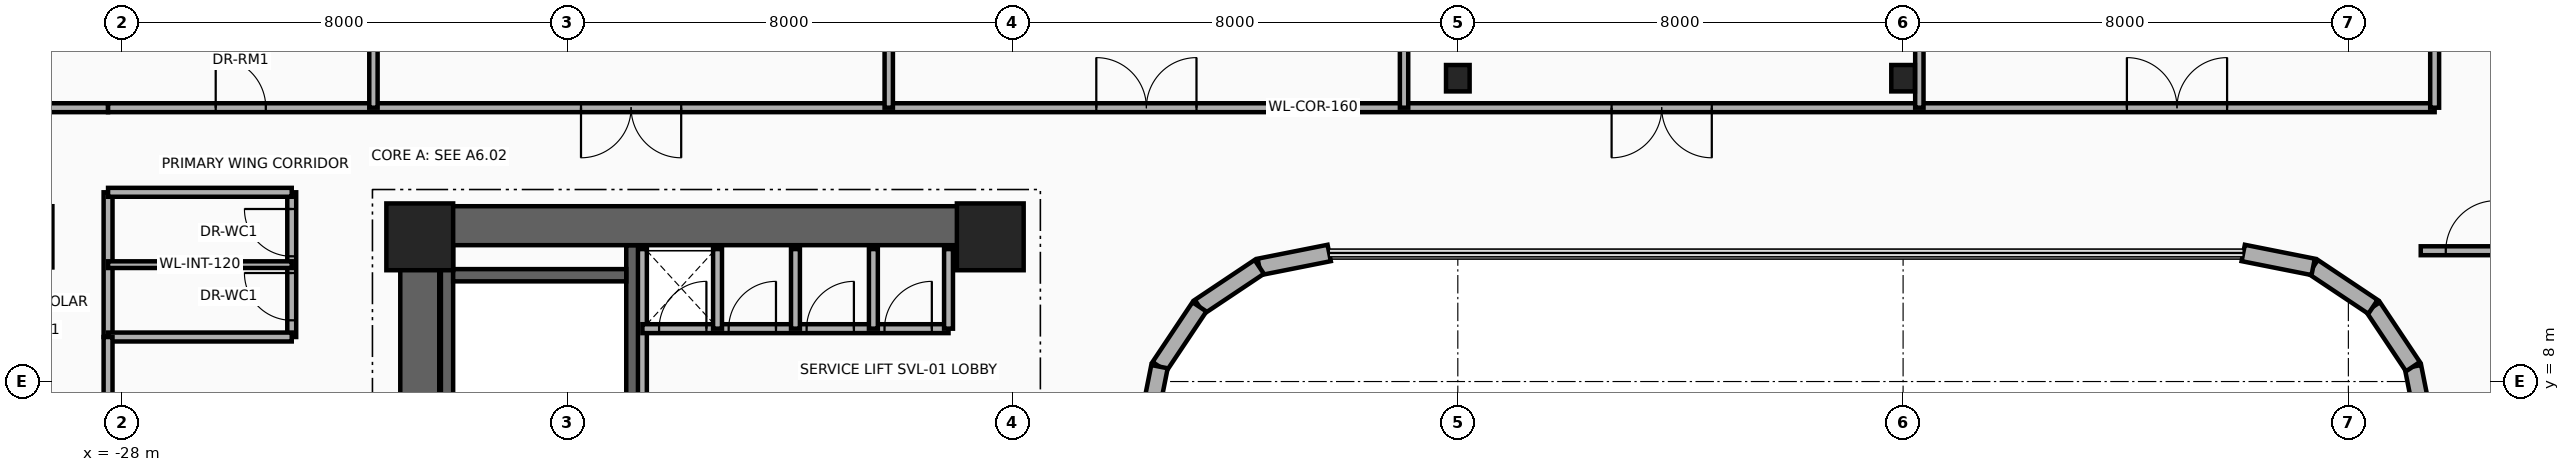
"""IFC4 building model, lengths in metres.
Left out: names, types, materials, properties, quantities, classifications, styles, units other than length and angle.
Written with IfcOpenShell. Run it as: python <this file> out.ifc"""

import sys

from ifc_helpers import new_model, si_unit, direction, frame, frame_2d, origin, origin_2d, place, context, subcontext, project, spatial, rectangle, i_section, extrude, source, transform, mapped, element, fill, save


model = new_model("IFC4")
c1 = context("Model", 3, precision=1e-05, world=origin(), true_north=direction((0.0, 1.0)))
c2 = subcontext(c1, "Body", "Model", "MODEL_VIEW")
j1 = project(units=[si_unit("LENGTHUNIT", "METRE"), si_unit("PLANEANGLEUNIT", "RADIAN")], contexts=[c1])
p1 = place(None, origin())
s1 = spatial("IfcSite", under=j1, at=p1, CompositionType="ELEMENT")
p2 = place(p1, origin())
s2 = spatial("IfcBuilding", under=s1, at=p2, CompositionType="ELEMENT")
p3 = place(p2, frame((0.0, 0.0, 139.0)))
s3 = spatial("IfcBuildingStorey", under=s2, at=p3, CompositionType="ELEMENT", Elevation=139.0)
for number, where, z_axis, x_axis in (
    (1, (-22.16, 1.78, 0.0), (0.0, 0.0, 1.0), (0.0, 1.0, 0.0)),
    (2, (-18.83, 1.78, 0.0), (0.0, 0.0, 1.0), (0.0, 1.0, 0.0)),
):
    element("IfcWall", number, at=place(p3, frame(where, z_axis=z_axis, x_axis=x_axis)), inside=s3, PredefinedType="SHEAR", context=c2, shape_type="SweptSolid", body=[
        extrude(rectangle(XDim=8.67, YDim=0.22, at=frame_2d((4.335, 0.0))), origin(), (0.0, 0.0, 1.0), 3.46),
    ])
p4 = place(p3, frame((-22.05, 9.91, 0.0), z_axis=(0.0, 0.0, 1.0), x_axis=(1.0, 0.0, 0.0)))
e3 = element("IfcWall", 3, at=p4, inside=s3, PredefinedType="SHEAR", context=c2, shape_type="SweptSolid", body=[
    extrude(rectangle(XDim=3.11, YDim=0.22, at=frame_2d((1.555, 0.0))), origin(), (0.0, 0.0, 1.0), 3.46),
])
p5 = place(p3, frame((-22.65, -11.15, 0.0), z_axis=(0.0, 0.0, 1.0), x_axis=(0.0, 1.0, 0.0)))
e4 = element("IfcWall", 4, at=p5, inside=s3, PredefinedType="SHEAR", context=c2, shape_type="SweptSolid", body=[
    extrude(rectangle(XDim=22.3, YDim=0.7, at=frame_2d((11.15, 0.0))), origin(), (0.0, 0.0, 1.0), 3.46),
])
p6 = place(p3, frame((-22.65, 10.8, 0.0), z_axis=(0.0, 0.0, 1.0), x_axis=(1.0, 0.0, 0.0)))
e5 = element("IfcWall", 5, at=p6, inside=s3, PredefinedType="SHEAR", context=c2, shape_type="SweptSolid", body=[
    extrude(rectangle(XDim=10.25, YDim=0.7, at=frame_2d((5.125, 0.0))), origin(), (0.0, 0.0, 1.0), 3.46),
])
m1 = source(origin(), c2, "Body", "SweptSolid", [
    extrude(rectangle(XDim=1.2, YDim=1.2, at=origin_2d()), origin(), (0.0, 0.0, 1.0), 3.7),
])
for number, where, z_axis, x_axis in (
    (6, (-22.65, 10.6, 0.0), (0.0, 0.0, 1.0), (1.0, 0.0, 0.0)),
    (7, (-12.4, 10.6, 0.0), (0.0, 0.0, 1.0), (1.0, 0.0, 0.0)),
):
    element("IfcColumn", number, at=place(p3, frame(where, z_axis=z_axis, x_axis=x_axis)), inside=s3, PredefinedType="COLUMN", context=c2, shape_type="MappedRepresentation", body=[
        mapped(m1, transform((0.0, 0.0, 0.0), x_axis=(1.0, 0.0, 0.0), y_axis=(0.0, 1.0, 0.0), z_axis=(0.0, 0.0, 1.0), scale=1.0)),
    ])
m2 = source(origin(), c2, "Body", "SweptSolid", [
    extrude(i_section(OverallWidth=0.424, OverallDepth=0.474, WebThickness=0.048, FlangeThickness=0.077, at=origin_2d()), origin(), (0.0, 0.0, 1.0), 3.7),
])
for number, where, z_axis, x_axis in (
    (8, (-4.0, 13.45, 0.0), (0.0, 0.0, 1.0), (1.0, 0.0, 0.0)),
    (9, (4.0, 13.45, 0.0), (0.0, 0.0, 1.0), (1.0, 0.0, 0.0)),
):
    element("IfcColumn", number, at=place(p3, frame(where, z_axis=z_axis, x_axis=x_axis)), inside=s3, PredefinedType="COLUMN", context=c2, shape_type="MappedRepresentation", body=[
        mapped(m2, transform((0.0, 0.0, 0.0), x_axis=(1.0, 0.0, 0.0), y_axis=(0.0, 1.0, 0.0), z_axis=(0.0, 0.0, 1.0), scale=1.0)),
    ])
p7 = place(p3, frame((13.41, 7.011, 0.0), z_axis=(0.0, 0.0, 1.0), x_axis=(-0.195090163074, 0.980785312019, 0.0)))
e10 = element("IfcWall", 10, at=p7, inside=s3, PredefinedType="SOLIDWALL", context=c2, shape_type="SweptSolid", body=[
    extrude(rectangle(XDim=1.281, YDim=0.3, at=frame_2d((0.641, 0.0))), origin(), (0.0, 0.0, 1.0), 3.46),
])
for number, where, z_axis, x_axis in (
    (11, (13.16, 8.268, 0.0), (0.0, 0.0, 1.0), (-0.556, 0.831, 0.0)),
    (12, (12.442, 9.342, 0.0), (0.0, 0.0, 1.0), (-0.831, 0.556, 0.0)),
):
    element("IfcWall", number, at=place(p3, frame(where, z_axis=z_axis, x_axis=x_axis)), inside=s3, PredefinedType="SOLIDWALL", context=c2, shape_type="SweptSolid", body=[
        extrude(rectangle(XDim=1.292, YDim=0.3, at=frame_2d((0.646, 0.0))), origin(), (0.0, 0.0, 1.0), 3.46),
    ])
for number, where, z_axis, x_axis in (
    (13, (11.367, 10.06, 0.0), (0.0, 0.0, 1.0), (-0.981, 0.195, 0.0)),
    (14, (-6.311, 10.31, 0.0), (0.0, 0.0, 1.0), (-0.981, -0.195, 0.0)),
):
    element("IfcWall", number, at=place(p3, frame(where, z_axis=z_axis, x_axis=x_axis)), inside=s3, PredefinedType="SOLIDWALL", context=c2, shape_type="SweptSolid", body=[
        extrude(rectangle(XDim=1.281, YDim=0.3, at=frame_2d((0.641, 0.0))), origin(), (0.0, 0.0, 1.0), 3.46),
    ])
p8 = place(p3, frame((-7.567, 10.06, 0.0), z_axis=(0.0, 0.0, 1.0), x_axis=(-0.831497739511, -0.555528135371, 0.0)))
e15 = element("IfcWall", 15, at=p8, inside=s3, PredefinedType="SOLIDWALL", context=c2, shape_type="SweptSolid", body=[
    extrude(rectangle(XDim=1.292, YDim=0.3, at=frame_2d((0.646, 0.0))), origin(), (0.0, 0.0, 1.0), 3.46),
])
p9 = place(p3, frame((-8.642, 9.342, 0.0), z_axis=(0.0, 0.0, 1.0), x_axis=(-0.555615398575, -0.831439431869, 0.0)))
e16 = element("IfcWall", 16, at=p9, inside=s3, PredefinedType="SOLIDWALL", context=c2, shape_type="SweptSolid", body=[
    extrude(rectangle(XDim=1.292, YDim=0.3, at=frame_2d((0.646, 0.0))), origin(), (0.0, 0.0, 1.0), 3.46),
])
p10 = place(p3, frame((-9.36, 8.268, 0.0), z_axis=(0.0, 0.0, 1.0), x_axis=(-0.195090163074, -0.980785312019, 0.0)))
e17 = element("IfcWall", 17, at=p10, inside=s3, PredefinedType="SOLIDWALL", context=c2, shape_type="SweptSolid", body=[
    extrude(rectangle(XDim=1.281, YDim=0.3, at=frame_2d((0.641, 0.0))), origin(), (0.0, 0.0, 1.0), 3.46),
])
p11 = place(p3, frame((-18.65, 7.45, 0.0), z_axis=(0.0, 0.0, 1.0), x_axis=(0.0, 1.0, 0.0)))
e18 = element("IfcWall", 18, at=p11, inside=s3, PredefinedType="PARTITIONING", context=c2, shape_type="SweptSolid", body=[
    extrude(rectangle(XDim=2.93, YDim=0.16, at=frame_2d((1.465, 0.0))), origin(), (0.0, 0.0, 1.0), 3.46),
])
p12 = place(p3, frame((-18.65, 8.95, 0.0), z_axis=(0.0, 0.0, 1.0), x_axis=(1.0, 0.0, 0.0)))
e19 = element("IfcWall", 19, at=p12, inside=s3, PredefinedType="PARTITIONING", context=c2, shape_type="SweptSolid", body=[
    extrude(rectangle(XDim=5.5, YDim=0.16, at=frame_2d((2.75, 0.0))), origin(), (0.0, 0.0, 1.0), 3.46),
])
p13 = place(p12, frame((0.3, 0.0, 0.0)))
e20 = element("IfcOpeningElement", 20, at=p13, cuts=e19, PredefinedType="OPENING", context=c2, shape_type="SweptSolid", body=[
    extrude(rectangle(XDim=0.85, YDim=2.05, at=frame_2d((0.425, 1.025))), frame((0.0, 0.095, 0.0), z_axis=(0.0, -1.0, 0.0), x_axis=(1.0, 0.0, 0.0)), (0.0, 0.0, 1.0), 0.19),
])
p14 = place(p12, frame((1.55, 0.0, 0.0)))
e21 = element("IfcOpeningElement", 21, at=p14, cuts=e19, PredefinedType="OPENING", context=c2, shape_type="SweptSolid", body=[
    extrude(rectangle(XDim=0.85, YDim=2.05, at=frame_2d((0.425, 1.025))), frame((0.0, 0.095, 0.0), z_axis=(0.0, -1.0, 0.0), x_axis=(1.0, 0.0, 0.0)), (0.0, 0.0, 1.0), 0.19),
])
p15 = place(p12, frame((2.95, 0.0, 0.0)))
e22 = element("IfcOpeningElement", 22, at=p15, cuts=e19, PredefinedType="OPENING", context=c2, shape_type="SweptSolid", body=[
    extrude(rectangle(XDim=0.85, YDim=2.05, at=frame_2d((0.425, 1.025))), frame((0.0, 0.095, 0.0), z_axis=(0.0, -1.0, 0.0), x_axis=(1.0, 0.0, 0.0)), (0.0, 0.0, 1.0), 0.19),
])
p16 = place(p12, frame((4.35, 0.0, 0.0)))
e23 = element("IfcOpeningElement", 23, at=p16, cuts=e19, PredefinedType="OPENING", context=c2, shape_type="SweptSolid", body=[
    extrude(rectangle(XDim=0.85, YDim=2.05, at=frame_2d((0.425, 1.025))), frame((0.0, 0.095, 0.0), z_axis=(0.0, -1.0, 0.0), x_axis=(1.0, 0.0, 0.0)), (0.0, 0.0, 1.0), 0.19),
])
for number, where, z_axis, x_axis in (
    (24, (-13.15, 8.95, 0.0), (0.0, 0.0, 1.0), (0.0, 1.0, 0.0)),
    (25, (-17.3, 8.95, 0.0), (0.0, 0.0, 1.0), (0.0, 1.0, 0.0)),
    (26, (-15.9, 8.95, 0.0), (0.0, 0.0, 1.0), (0.0, 1.0, 0.0)),
    (27, (-14.5, 8.95, 0.0), (0.0, 0.0, 1.0), (0.0, 1.0, 0.0)),
):
    element("IfcWall", number, at=place(p3, frame(where, z_axis=z_axis, x_axis=x_axis)), inside=s3, PredefinedType="PARTITIONING", context=c2, shape_type="SweptSolid", body=[
        extrude(rectangle(XDim=1.43, YDim=0.16, at=frame_2d((0.715, 0.0))), origin(), (0.0, 0.0, 1.0), 3.46),
    ])
p17 = place(p3, frame((-28.25, 8.8, 0.0), z_axis=(0.0, 0.0, 1.0), x_axis=(0.0, 1.0, 0.0)))
e28 = element("IfcWall", 28, at=p17, inside=s3, PredefinedType="PARTITIONING", context=c2, shape_type="SweptSolid", body=[
    extrude(rectangle(XDim=2.6, YDim=0.16, at=frame_2d((1.3, 0.0))), origin(), (0.0, 0.0, 1.0), 2.666),
])
p18 = place(p3, frame((-24.95, 8.8, 0.0), z_axis=(0.0, 0.0, 1.0), x_axis=(0.0, 1.0, 0.0)))
e29 = element("IfcWall", 29, at=p18, inside=s3, PredefinedType="PARTITIONING", context=c2, shape_type="SweptSolid", body=[
    extrude(rectangle(XDim=2.6, YDim=0.16, at=frame_2d((1.3, 0.0))), origin(), (0.0, 0.0, 1.0), 2.666),
])
p19 = place(p18, frame((0.3, 0.0, 0.0)))
e30 = element("IfcOpeningElement", 30, at=p19, cuts=e29, PredefinedType="OPENING", context=c2, shape_type="SweptSolid", body=[
    extrude(rectangle(XDim=0.85, YDim=2.1, at=frame_2d((0.425, 1.05))), frame((0.0, 0.095, 0.0), z_axis=(0.0, -1.0, 0.0), x_axis=(1.0, 0.0, 0.0)), (0.0, 0.0, 1.0), 0.19),
])
p20 = place(p18, frame((1.45, 0.0, 0.0)))
e31 = element("IfcOpeningElement", 31, at=p20, cuts=e29, PredefinedType="OPENING", context=c2, shape_type="SweptSolid", body=[
    extrude(rectangle(XDim=0.85, YDim=2.1, at=frame_2d((0.425, 1.05))), frame((0.0, 0.095, 0.0), z_axis=(0.0, -1.0, 0.0), x_axis=(1.0, 0.0, 0.0)), (0.0, 0.0, 1.0), 0.19),
])
for number, where, z_axis, x_axis in (
    (32, (-28.25, 8.8, 0.0), (0.0, 0.0, 1.0), (1.0, 0.0, 0.0)),
    (33, (-28.25, 11.4, 0.0), (0.0, 0.0, 1.0), (1.0, 0.0, 0.0)),
):
    element("IfcWall", number, at=place(p3, frame(where, z_axis=z_axis, x_axis=x_axis)), inside=s3, PredefinedType="PARTITIONING", context=c2, shape_type="SweptSolid", body=[
        extrude(rectangle(XDim=3.3, YDim=0.16, at=frame_2d((1.65, 0.0))), origin(), (0.0, 0.0, 1.0), 3.46),
    ])
p21 = place(p3, frame((-28.25, 10.1, 0.0), z_axis=(0.0, 0.0, 1.0), x_axis=(1.0, 0.0, 0.0)))
e34 = element("IfcWall", 34, at=p21, inside=s3, PredefinedType="PARTITIONING", context=c2, shape_type="SweptSolid", body=[
    extrude(rectangle(XDim=3.3, YDim=0.12, at=frame_2d((1.65, 0.0))), origin(), (0.0, 0.0, 1.0), 3.46),
])
p22 = place(p3, frame((-28.25, 7.6, 0.0), z_axis=(0.0, 0.0, 1.0), x_axis=(0.0, 1.0, 0.0)))
e35 = element("IfcWall", 35, at=p22, inside=s3, PredefinedType="PARTITIONING", context=c2, shape_type="SweptSolid", body=[
    extrude(rectangle(XDim=1.2, YDim=0.16, at=frame_2d((0.6, 0.0))), origin(), (0.0, 0.0, 1.0), 2.988),
])
p23 = place(p3, frame((-30.89, 12.92, 0.0), z_axis=(0.0, 0.0, 1.0), x_axis=(1.0, 0.0, 0.0)))
e36 = element("IfcWall", 36, at=p23, inside=s3, PredefinedType="PARTITIONING", context=c2, shape_type="SweptSolid", body=[
    extrude(rectangle(XDim=2.64, YDim=0.16, at=frame_2d((1.32, 0.0))), origin(), (0.0, 0.0, 1.0), 2.896),
])
p24 = place(p3, frame((-28.25, 12.92, 0.0), z_axis=(0.0, 0.0, 1.0), x_axis=(1.0, 0.0, 0.0)))
e37 = element("IfcWall", 37, at=p24, inside=s3, PredefinedType="PARTITIONING", context=c2, shape_type="SweptSolid", body=[
    extrude(rectangle(XDim=41.8, YDim=0.16, at=frame_2d((20.9, 0.0))), origin(), (0.0, 0.0, 1.0), 2.666),
])
p25 = place(p24, frame((1.934, 0.0, 0.0)))
e38 = element("IfcOpeningElement", 38, at=p25, cuts=e37, PredefinedType="OPENING", context=c2, shape_type="SweptSolid", body=[
    extrude(rectangle(XDim=0.9, YDim=2.1, at=frame_2d((0.45, 1.05))), frame((0.0, 0.095, 0.0), z_axis=(0.0, -1.0, 0.0), x_axis=(1.0, 0.0, 0.0)), (0.0, 0.0, 1.0), 0.19),
])
p26 = place(p24, frame((8.497, 0.0, 0.0)))
e39 = element("IfcOpeningElement", 39, at=p26, cuts=e37, PredefinedType="OPENING", context=c2, shape_type="SweptSolid", body=[
    extrude(rectangle(XDim=1.8, YDim=2.15, at=frame_2d((0.9, 1.075))), frame((0.0, 0.095, 0.0), z_axis=(0.0, -1.0, 0.0), x_axis=(1.0, 0.0, 0.0)), (0.0, 0.0, 1.0), 0.19),
])
p27 = place(p24, frame((17.755, 0.0, 0.0)))
e40 = element("IfcOpeningElement", 40, at=p27, cuts=e37, PredefinedType="OPENING", context=c2, shape_type="SweptSolid", body=[
    extrude(rectangle(XDim=1.8, YDim=2.15, at=frame_2d((0.9, 1.075))), frame((0.0, 0.095, 0.0), z_axis=(0.0, -1.0, 0.0), x_axis=(1.0, 0.0, 0.0)), (0.0, 0.0, 1.0), 0.19),
])
p28 = place(p24, frame((27.013, 0.0, 0.0)))
e41 = element("IfcOpeningElement", 41, at=p28, cuts=e37, PredefinedType="OPENING", context=c2, shape_type="SweptSolid", body=[
    extrude(rectangle(XDim=1.8, YDim=2.15, at=frame_2d((0.9, 1.075))), frame((0.0, 0.095, 0.0), z_axis=(0.0, -1.0, 0.0), x_axis=(1.0, 0.0, 0.0)), (0.0, 0.0, 1.0), 0.19),
])
p29 = place(p24, frame((36.271, 0.0, 0.0)))
e42 = element("IfcOpeningElement", 42, at=p29, cuts=e37, PredefinedType="OPENING", context=c2, shape_type="SweptSolid", body=[
    extrude(rectangle(XDim=1.8, YDim=2.15, at=frame_2d((0.9, 1.075))), frame((0.0, 0.095, 0.0), z_axis=(0.0, -1.0, 0.0), x_axis=(1.0, 0.0, 0.0)), (0.0, 0.0, 1.0), 0.19),
])
p30 = place(p3, frame((13.55, 12.92, 0.0), z_axis=(0.0, 0.0, 1.0), x_axis=(0.0, 1.0, 0.0)))
e43 = element("IfcWall", 43, at=p30, inside=s3, PredefinedType="PARTITIONING", context=c2, shape_type="SweptSolid", body=[
    extrude(rectangle(XDim=5.857, YDim=0.16, at=frame_2d((2.928, 0.0))), origin(), (0.0, 0.0, 1.0), 2.666),
])
p31 = place(p3, frame((-23.482, 12.92, 0.0), z_axis=(0.0, 0.0, 1.0), x_axis=(0.0, 1.0, 0.0)))
e44 = element("IfcWall", 44, at=p31, inside=s3, PredefinedType="PARTITIONING", context=c2, shape_type="SweptSolid", body=[
    extrude(rectangle(XDim=6.409, YDim=0.15, at=frame_2d((3.204, 0.0))), origin(), (0.0, 0.0, 1.0), 2.666),
])
for number, where, z_axis, x_axis in (
    (45, (-14.224, 12.92, 0.0), (0.0, 0.0, 1.0), (0.0, 1.0, 0.0)),
    (46, (-4.966, 12.92, 0.0), (0.0, 0.0, 1.0), (0.0, 1.0, 0.0)),
):
    element("IfcWall", number, at=place(p3, frame(where, z_axis=z_axis, x_axis=x_axis)), inside=s3, PredefinedType="PARTITIONING", context=c2, shape_type="SweptSolid", body=[
        extrude(rectangle(XDim=7.196, YDim=0.15, at=frame_2d((3.598, 0.0))), origin(), (0.0, 0.0, 1.0), 2.666),
    ])
p32 = place(p3, frame((4.292, 12.92, 0.0), z_axis=(0.0, 0.0, 1.0), x_axis=(0.0, 1.0, 0.0)))
e47 = element("IfcWall", 47, at=p32, inside=s3, PredefinedType="PARTITIONING", context=c2, shape_type="SweptSolid", body=[
    extrude(rectangle(XDim=6.775, YDim=0.15, at=frame_2d((3.387, 0.0))), origin(), (0.0, 0.0, 1.0), 2.666),
])
p33 = place(p3, frame((13.3, 10.35, 0.0), z_axis=(0.0, 0.0, 1.0), x_axis=(1.0, 0.0, 0.0)))
e48 = element("IfcWall", 48, at=p33, inside=s3, PredefinedType="PARTITIONING", context=c2, shape_type="SweptSolid", body=[
    extrude(rectangle(XDim=2.1, YDim=0.16, at=frame_2d((1.05, 0.0))), origin(), (0.0, 0.0, 1.0), 2.666),
])
p34 = place(p33, frame((0.45, 0.0, 0.0)))
e49 = element("IfcOpeningElement", 49, at=p34, cuts=e48, PredefinedType="OPENING", context=c2, shape_type="SweptSolid", body=[
    extrude(rectangle(XDim=0.9, YDim=2.1, at=frame_2d((0.45, 1.05))), frame((0.0, 0.095, 0.0), z_axis=(0.0, -1.0, 0.0), x_axis=(1.0, 0.0, 0.0)), (0.0, 0.0, 1.0), 0.19),
])
p35 = place(p13, origin())
e50 = element("IfcDoor", 50, at=p35, inside=s3, OperationType="SINGLE_SWING_LEFT", PredefinedType="DOOR", context=c2, shape_type="SweptSolid", body=[
    extrude(rectangle(XDim=0.85, YDim=2.05, at=frame_2d((0.425, 1.025))), frame((0.0, 0.025, 0.0), z_axis=(0.0, -1.0, 0.0), x_axis=(1.0, 0.0, 0.0)), (0.0, 0.0, 1.0), 0.05),
])
fill(e20, e50)
p36 = place(p14, origin())
e51 = element("IfcDoor", 51, at=p36, inside=s3, OperationType="SINGLE_SWING_RIGHT", PredefinedType="DOOR", context=c2, shape_type="SweptSolid", body=[
    extrude(rectangle(XDim=0.85, YDim=2.05, at=frame_2d((0.425, 1.025))), frame((0.0, 0.025, 0.0), z_axis=(0.0, -1.0, 0.0), x_axis=(1.0, 0.0, 0.0)), (0.0, 0.0, 1.0), 0.05),
])
fill(e21, e51)
p37 = place(p15, origin())
e52 = element("IfcDoor", 52, at=p37, inside=s3, OperationType="SINGLE_SWING_LEFT", PredefinedType="DOOR", context=c2, shape_type="SweptSolid", body=[
    extrude(rectangle(XDim=0.85, YDim=2.05, at=frame_2d((0.425, 1.025))), frame((0.0, 0.025, 0.0), z_axis=(0.0, -1.0, 0.0), x_axis=(1.0, 0.0, 0.0)), (0.0, 0.0, 1.0), 0.05),
])
fill(e22, e52)
p38 = place(p16, origin())
e53 = element("IfcDoor", 53, at=p38, inside=s3, OperationType="SINGLE_SWING_RIGHT", PredefinedType="DOOR", context=c2, shape_type="SweptSolid", body=[
    extrude(rectangle(XDim=0.85, YDim=2.05, at=frame_2d((0.425, 1.025))), frame((0.0, 0.025, 0.0), z_axis=(0.0, -1.0, 0.0), x_axis=(1.0, 0.0, 0.0)), (0.0, 0.0, 1.0), 0.05),
])
fill(e23, e53)
p39 = place(p19, origin())
e54 = element("IfcDoor", 54, at=p39, inside=s3, OperationType="SINGLE_SWING_RIGHT", PredefinedType="DOOR", context=c2, shape_type="SweptSolid", body=[
    extrude(rectangle(XDim=0.85, YDim=2.1, at=frame_2d((0.425, 1.05))), frame((0.0, 0.025, 0.0), z_axis=(0.0, -1.0, 0.0), x_axis=(1.0, 0.0, 0.0)), (0.0, 0.0, 1.0), 0.05),
])
fill(e30, e54)
p40 = place(p20, origin())
e55 = element("IfcDoor", 55, at=p40, inside=s3, OperationType="SINGLE_SWING_LEFT", PredefinedType="DOOR", context=c2, shape_type="SweptSolid", body=[
    extrude(rectangle(XDim=0.85, YDim=2.1, at=frame_2d((0.425, 1.05))), frame((0.0, 0.025, 0.0), z_axis=(0.0, -1.0, 0.0), x_axis=(1.0, 0.0, 0.0)), (0.0, 0.0, 1.0), 0.05),
])
fill(e31, e55)
p41 = place(p25, origin())
e56 = element("IfcDoor", 56, at=p41, inside=s3, OperationType="SINGLE_SWING_RIGHT", PredefinedType="DOOR", context=c2, shape_type="SweptSolid", body=[
    extrude(rectangle(XDim=0.9, YDim=2.1, at=frame_2d((0.45, 1.05))), frame((0.0, 0.025, 0.0), z_axis=(0.0, -1.0, 0.0), x_axis=(1.0, 0.0, 0.0)), (0.0, 0.0, 1.0), 0.05),
])
fill(e38, e56)
p42 = place(p26, frame((1.8, 0.0, 0.0), z_axis=(0.0, 0.0, 1.0), x_axis=(-1.0, 0.0, 0.0)))
e57 = element("IfcDoor", 57, at=p42, inside=s3, OperationType="DOUBLE_DOOR_SINGLE_SWING", PredefinedType="DOOR", context=c2, shape_type="SweptSolid", body=[
    extrude(rectangle(XDim=1.8, YDim=2.15, at=frame_2d((0.9, 1.075))), frame((0.0, 0.025, 0.0), z_axis=(0.0, -1.0, 0.0), x_axis=(1.0, 0.0, 0.0)), (0.0, 0.0, 1.0), 0.05),
])
fill(e39, e57)
p43 = place(p27, origin())
e58 = element("IfcDoor", 58, at=p43, inside=s3, OperationType="DOUBLE_DOOR_SINGLE_SWING", PredefinedType="DOOR", context=c2, shape_type="SweptSolid", body=[
    extrude(rectangle(XDim=1.8, YDim=2.15, at=frame_2d((0.9, 1.075))), frame((0.0, 0.025, 0.0), z_axis=(0.0, -1.0, 0.0), x_axis=(1.0, 0.0, 0.0)), (0.0, 0.0, 1.0), 0.05),
])
fill(e40, e58)
p44 = place(p28, frame((1.8, 0.0, 0.0), z_axis=(0.0, 0.0, 1.0), x_axis=(-1.0, 0.0, 0.0)))
e59 = element("IfcDoor", 59, at=p44, inside=s3, OperationType="DOUBLE_DOOR_SINGLE_SWING", PredefinedType="DOOR", context=c2, shape_type="SweptSolid", body=[
    extrude(rectangle(XDim=1.8, YDim=2.15, at=frame_2d((0.9, 1.075))), frame((0.0, 0.025, 0.0), z_axis=(0.0, -1.0, 0.0), x_axis=(1.0, 0.0, 0.0)), (0.0, 0.0, 1.0), 0.05),
])
fill(e41, e59)
p45 = place(p29, origin())
e60 = element("IfcDoor", 60, at=p45, inside=s3, OperationType="DOUBLE_DOOR_SINGLE_SWING", PredefinedType="DOOR", context=c2, shape_type="SweptSolid", body=[
    extrude(rectangle(XDim=1.8, YDim=2.15, at=frame_2d((0.9, 1.075))), frame((0.0, 0.025, 0.0), z_axis=(0.0, -1.0, 0.0), x_axis=(1.0, 0.0, 0.0)), (0.0, 0.0, 1.0), 0.05),
])
fill(e42, e60)
p46 = place(p34, origin())
e61 = element("IfcDoor", 61, at=p46, inside=s3, OperationType="SINGLE_SWING_RIGHT", PredefinedType="DOOR", context=c2, shape_type="SweptSolid", body=[
    extrude(rectangle(XDim=0.9, YDim=2.1, at=frame_2d((0.45, 1.05))), frame((0.0, 0.025, 0.0), z_axis=(0.0, -1.0, 0.0), x_axis=(1.0, 0.0, 0.0)), (0.0, 0.0, 1.0), 0.05),
])
fill(e49, e61)
save(model, sys.argv[1])
